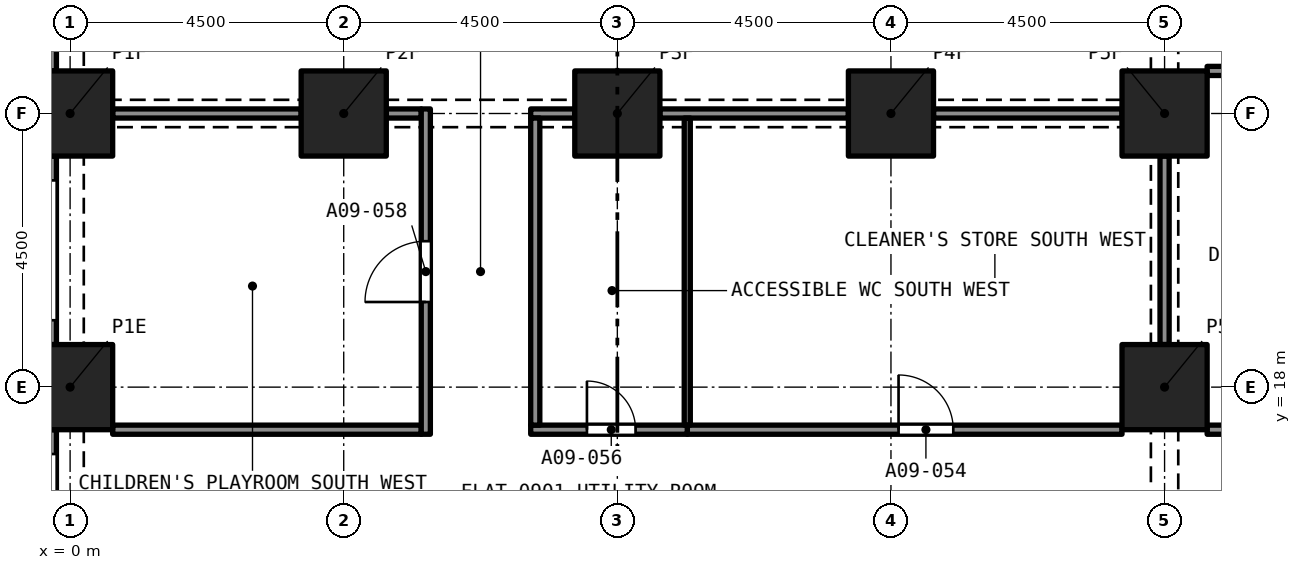
"""IFC4 building model, lengths in metres.
Left out: names, types, materials, properties, quantities, classifications, styles, units other than length and angle.
Written with IfcOpenShell. Run it as: python <this file> out.ifc"""

import sys

from ifc_helpers import new_model, si_unit, direction, frame, frame_2d, origin, origin_2d, place, context, subcontext, project, spatial, rectangle, extrude, element, fill, save


model = new_model("IFC4")
c1 = context("Model", 3, precision=1e-05, world=origin(), true_north=direction((0.0, 1.0)))
c2 = subcontext(c1, "Body", "Model", "MODEL_VIEW")
j1 = project(units=[si_unit("LENGTHUNIT", "METRE"), si_unit("PLANEANGLEUNIT", "RADIAN")], contexts=[c1])
p1 = place(None, origin())
s1 = spatial("IfcSite", under=j1, at=p1, CompositionType="ELEMENT")
p2 = place(p1, origin())
s2 = spatial("IfcBuilding", under=s1, at=p2, CompositionType="ELEMENT")
p3 = place(p2, frame((0.0, 0.0, 40.0)))
s3 = spatial("IfcBuildingStorey", under=s2, at=p3, CompositionType="ELEMENT", Elevation=40.0)
for number, where, z_axis, x_axis in (
    (1, (0.0, 18.0, 0.0), (0.0, 0.0, 1.0), (1.0, 0.0, 0.0)),
    (2, (18.0, 18.0, 0.0), (0.0, 0.0, 1.0), (1.0, 0.0, 0.0)),
    (3, (0.0, 22.5, 0.0), (0.0, 0.0, 1.0), (1.0, 0.0, 0.0)),
    (4, (4.5, 22.5, 0.0), (0.0, 0.0, 1.0), (1.0, 0.0, 0.0)),
    (5, (9.0, 22.5, 0.0), (0.0, 0.0, 1.0), (1.0, 0.0, 0.0)),
    (6, (13.5, 22.5, 0.0), (0.0, 0.0, 1.0), (1.0, 0.0, 0.0)),
    (7, (18.0, 22.5, 0.0), (0.0, 0.0, 1.0), (1.0, 0.0, 0.0)),
):
    element("IfcColumn", number, at=place(p3, frame(where, z_axis=z_axis, x_axis=x_axis)), inside=s3, PredefinedType="COLUMN", context=c2, shape_type="SweptSolid", body=[
        extrude(rectangle(XDim=1.4, YDim=1.4, at=origin_2d()), origin(), (0.0, 0.0, 1.0), 3.2),
    ])
p4 = place(p3, frame((-0.375, 23.2, 0.0), z_axis=(0.0, 0.0, 1.0), x_axis=(0.0, 1.0, 0.0)))
e8 = element("IfcWall", 8, at=p4, inside=s3, PredefinedType="SOLIDWALL", context=c2, shape_type="SweptSolid", body=[
    extrude(rectangle(XDim=3.1, YDim=0.3, at=frame_2d((1.55, 0.0))), origin(), (0.0, 0.0, 1.0), 3.2),
])
p5 = place(p4, frame((0.4, 0.0, 0.45)))
e9 = element("IfcOpeningElement", 9, at=p5, cuts=e8, PredefinedType="OPENING", context=c2, shape_type="SweptSolid", body=[
    extrude(rectangle(XDim=2.3, YDim=1.95, at=frame_2d((1.15, 0.975))), frame((0.0, 0.16, 0.0), z_axis=(0.0, -1.0, 0.0), x_axis=(1.0, 0.0, 0.0)), (0.0, 0.0, 1.0), 0.32),
])
p6 = place(p3, frame((-0.375, 18.7, 0.0), z_axis=(0.0, 0.0, 1.0), x_axis=(0.0, 1.0, 0.0)))
e10 = element("IfcWall", 10, at=p6, inside=s3, PredefinedType="SOLIDWALL", context=c2, shape_type="SweptSolid", body=[
    extrude(rectangle(XDim=3.1, YDim=0.3, at=frame_2d((1.55, 0.0))), origin(), (0.0, 0.0, 1.0), 3.2),
])
p7 = place(p6, frame((0.4, 0.0, 0.45)))
e11 = element("IfcOpeningElement", 11, at=p7, cuts=e10, PredefinedType="OPENING", context=c2, shape_type="SweptSolid", body=[
    extrude(rectangle(XDim=2.3, YDim=1.95, at=frame_2d((1.15, 0.975))), frame((0.0, 0.16, 0.0), z_axis=(0.0, -1.0, 0.0), x_axis=(1.0, 0.0, 0.0)), (0.0, 0.0, 1.0), 0.32),
])
p8 = place(p3, frame((-0.375, 14.2, 0.0), z_axis=(0.0, 0.0, 1.0), x_axis=(0.0, 1.0, 0.0)))
e12 = element("IfcWall", 12, at=p8, inside=s3, PredefinedType="SOLIDWALL", context=c2, shape_type="SweptSolid", body=[
    extrude(rectangle(XDim=3.1, YDim=0.3, at=frame_2d((1.55, 0.0))), origin(), (0.0, 0.0, 1.0), 3.2),
])
p9 = place(p8, frame((0.4, 0.0, 0.45)))
e13 = element("IfcOpeningElement", 13, at=p9, cuts=e12, PredefinedType="OPENING", context=c2, shape_type="SweptSolid", body=[
    extrude(rectangle(XDim=2.3, YDim=1.95, at=frame_2d((1.15, 0.975))), frame((0.0, 0.16, 0.0), z_axis=(0.0, -1.0, 0.0), x_axis=(1.0, 0.0, 0.0)), (0.0, 0.0, 1.0), 0.32),
])
p10 = place(p3, frame((18.7, 17.3, 0.0), z_axis=(0.0, 0.0, 1.0), x_axis=(1.0, 0.0, 0.0)))
e14 = element("IfcWall", 14, at=p10, inside=s3, PredefinedType="PARTITIONING", context=c2, shape_type="SweptSolid", body=[
    extrude(rectangle(XDim=5.075, YDim=0.15, at=frame_2d((2.538, 0.0))), origin(), (0.0, 0.0, 1.0), 2.75),
])
p11 = place(p3, frame((10.15, 17.3, 0.0), z_axis=(0.0, 0.0, 1.0), x_axis=(1.0, 0.0, 0.0)))
e15 = element("IfcWall", 15, at=p11, inside=s3, PredefinedType="PARTITIONING", context=c2, shape_type="SweptSolid", body=[
    extrude(rectangle(XDim=7.15, YDim=0.15, at=frame_2d((3.575, 0.0))), origin(), (0.0, 0.0, 1.0), 2.9),
])
p12 = place(p11, frame((3.475, 0.0, 0.0)))
e16 = element("IfcOpeningElement", 16, at=p12, cuts=e15, PredefinedType="OPENING", context=c2, shape_type="SweptSolid", body=[
    extrude(rectangle(XDim=0.9, YDim=2.1, at=frame_2d((0.45, 1.05))), frame((0.0, 0.085, 0.0), z_axis=(0.0, -1.0, 0.0), x_axis=(1.0, 0.0, 0.0)), (0.0, 0.0, 1.0), 0.17),
])
p13 = place(p3, frame((7.575, 17.3, 0.0), z_axis=(0.0, 0.0, 1.0), x_axis=(1.0, 0.0, 0.0)))
e17 = element("IfcWall", 17, at=p13, inside=s3, PredefinedType="PARTITIONING", context=c2, shape_type="SweptSolid", body=[
    extrude(rectangle(XDim=2.575, YDim=0.15, at=frame_2d((1.288, 0.0))), origin(), (0.0, 0.0, 1.0), 2.9),
])
p14 = place(p13, frame((0.925, 0.0, 0.0)))
e18 = element("IfcOpeningElement", 18, at=p14, cuts=e17, PredefinedType="OPENING", context=c2, shape_type="SweptSolid", body=[
    extrude(rectangle(XDim=0.8, YDim=2.1, at=frame_2d((0.4, 1.05))), frame((0.0, 0.085, 0.0), z_axis=(0.0, -1.0, 0.0), x_axis=(1.0, 0.0, 0.0)), (0.0, 0.0, 1.0), 0.17),
])
p15 = place(p3, frame((0.7, 17.3, 0.0), z_axis=(0.0, 0.0, 1.0), x_axis=(1.0, 0.0, 0.0)))
e19 = element("IfcWall", 19, at=p15, inside=s3, PredefinedType="PARTITIONING", context=c2, shape_type="SweptSolid", body=[
    extrude(rectangle(XDim=5.075, YDim=0.15, at=frame_2d((2.538, 0.0))), origin(), (0.0, 0.0, 1.0), 2.9),
])
p16 = place(p3, frame((18.7, 23.2, 0.0), z_axis=(0.0, 0.0, 1.0), x_axis=(1.0, 0.0, 0.0)))
e20 = element("IfcWall", 20, at=p16, inside=s3, PredefinedType="PARTITIONING", context=c2, shape_type="SweptSolid", body=[
    extrude(rectangle(XDim=5.075, YDim=0.15, at=frame_2d((2.538, 0.0))), origin(), (0.0, 0.0, 1.0), 2.75),
])
for number, where, z_axis, x_axis in (
    (21, (18.0, 18.7, 0.0), (0.0, 0.0, 1.0), (0.0, 1.0, 0.0)),
    (22, (14.2, 22.5, 0.0), (0.0, 0.0, 1.0), (1.0, 0.0, 0.0)),
    (23, (9.7, 22.5, 0.0), (0.0, 0.0, 1.0), (1.0, 0.0, 0.0)),
):
    element("IfcWall", number, at=place(p3, frame(where, z_axis=z_axis, x_axis=x_axis)), inside=s3, PredefinedType="PARTITIONING", context=c2, shape_type="SweptSolid", body=[
        extrude(rectangle(XDim=3.1, YDim=0.15, at=frame_2d((1.55, 0.0))), origin(), (0.0, 0.0, 1.0), 2.38),
    ])
p17 = place(p3, frame((7.575, 22.5, 0.0), z_axis=(0.0, 0.0, 1.0), x_axis=(1.0, 0.0, 0.0)))
e24 = element("IfcWall", 24, at=p17, inside=s3, PredefinedType="PARTITIONING", context=c2, shape_type="SweptSolid", body=[
    extrude(rectangle(XDim=0.725, YDim=0.15, at=frame_2d((0.363, 0.0))), origin(), (0.0, 0.0, 1.0), 2.38),
])
p18 = place(p3, frame((5.2, 22.5, 0.0), z_axis=(0.0, 0.0, 1.0), x_axis=(1.0, 0.0, 0.0)))
e25 = element("IfcWall", 25, at=p18, inside=s3, PredefinedType="PARTITIONING", context=c2, shape_type="SweptSolid", body=[
    extrude(rectangle(XDim=0.575, YDim=0.15, at=frame_2d((0.288, 0.0))), origin(), (0.0, 0.0, 1.0), 2.38),
])
p19 = place(p3, frame((0.7, 22.5, 0.0), z_axis=(0.0, 0.0, 1.0), x_axis=(1.0, 0.0, 0.0)))
e26 = element("IfcWall", 26, at=p19, inside=s3, PredefinedType="PARTITIONING", context=c2, shape_type="SweptSolid", body=[
    extrude(rectangle(XDim=3.1, YDim=0.15, at=frame_2d((1.55, 0.0))), origin(), (0.0, 0.0, 1.0), 2.38),
])
p20 = place(p3, frame((7.65, 17.375, 0.0), z_axis=(0.0, 0.0, 1.0), x_axis=(0.0, 1.0, 0.0)))
e27 = element("IfcWall", 27, at=p20, inside=s3, PredefinedType="PARTITIONING", context=c2, shape_type="SweptSolid", body=[
    extrude(rectangle(XDim=5.05, YDim=0.15, at=frame_2d((2.525, 0.0))), origin(), (0.0, 0.0, 1.0), 2.9),
])
p21 = place(p3, frame((5.85, 17.225, 0.0), z_axis=(0.0, 0.0, 1.0), x_axis=(0.0, 1.0, 0.0)))
e28 = element("IfcWall", 28, at=p21, inside=s3, PredefinedType="PARTITIONING", context=c2, shape_type="SweptSolid", body=[
    extrude(rectangle(XDim=5.35, YDim=0.15, at=frame_2d((2.675, 0.0))), origin(), (0.0, 0.0, 1.0), 2.9),
])
p22 = place(p21, frame((2.175, 0.0, 0.0)))
e29 = element("IfcOpeningElement", 29, at=p22, cuts=e28, PredefinedType="OPENING", context=c2, shape_type="SweptSolid", body=[
    extrude(rectangle(XDim=1.0, YDim=2.1, at=frame_2d((0.5, 1.05))), frame((0.0, 0.085, 0.0), z_axis=(0.0, -1.0, 0.0), x_axis=(1.0, 0.0, 0.0)), (0.0, 0.0, 1.0), 0.17),
])
p23 = place(p3, frame((10.15, 17.375, 0.0), z_axis=(0.0, 0.0, 1.0), x_axis=(0.0, 1.0, 0.0)))
e30 = element("IfcWall", 30, at=p23, inside=s3, PredefinedType="PARTITIONING", context=c2, shape_type="SweptSolid", body=[
    extrude(rectangle(XDim=5.05, YDim=0.1, at=frame_2d((2.525, 0.0))), origin(), (0.0, 0.0, 1.0), 2.9),
])
p24 = place(p12, origin())
e31 = element("IfcDoor", 31, at=p24, inside=s3, OperationType="SINGLE_SWING_RIGHT", PredefinedType="DOOR", context=c2, shape_type="SweptSolid", body=[
    extrude(rectangle(XDim=0.9, YDim=2.1, at=frame_2d((0.45, 1.05))), frame((0.0, 0.025, 0.0), z_axis=(0.0, -1.0, 0.0), x_axis=(1.0, 0.0, 0.0)), (0.0, 0.0, 1.0), 0.05),
])
fill(e16, e31)
p25 = place(p14, origin())
e32 = element("IfcDoor", 32, at=p25, inside=s3, OperationType="SINGLE_SWING_RIGHT", PredefinedType="DOOR", context=c2, shape_type="SweptSolid", body=[
    extrude(rectangle(XDim=0.8, YDim=2.1, at=frame_2d((0.4, 1.05))), frame((0.0, 0.025, 0.0), z_axis=(0.0, -1.0, 0.0), x_axis=(1.0, 0.0, 0.0)), (0.0, 0.0, 1.0), 0.05),
])
fill(e18, e32)
p26 = place(p22, origin())
e33 = element("IfcDoor", 33, at=p26, inside=s3, OperationType="SINGLE_SWING_LEFT", PredefinedType="DOOR", context=c2, shape_type="SweptSolid", body=[
    extrude(rectangle(XDim=1.0, YDim=2.1, at=frame_2d((0.5, 1.05))), frame((0.0, 0.025, 0.0), z_axis=(0.0, -1.0, 0.0), x_axis=(1.0, 0.0, 0.0)), (0.0, 0.0, 1.0), 0.05),
])
fill(e29, e33)
save(model, sys.argv[1])
